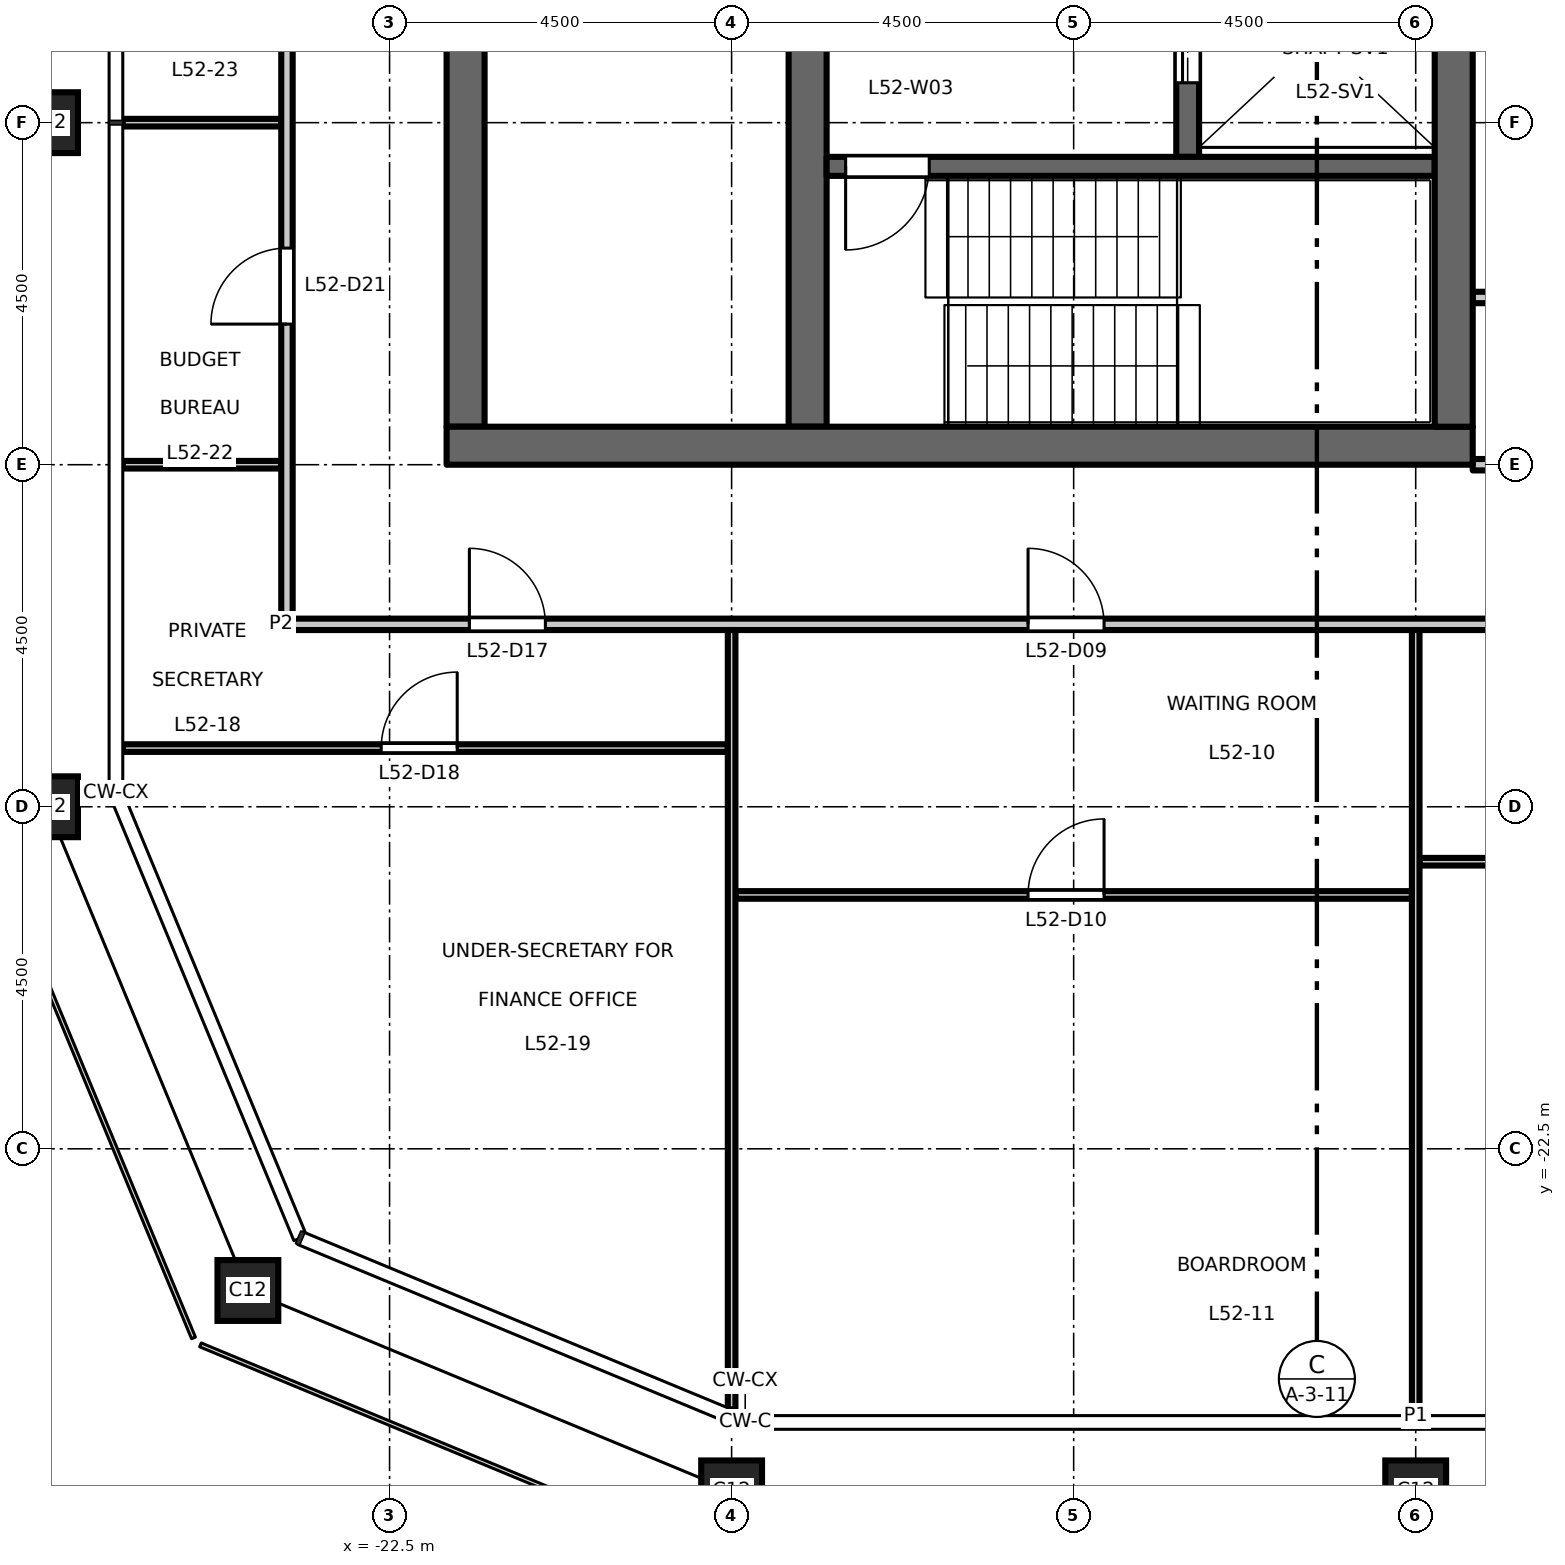
"""IFC4 building model, lengths in metres.
Left out: names, types, materials, properties, quantities, classifications, styles, units other than length and angle.
Written with IfcOpenShell. Run it as: python <this file> out.ifc"""

import sys

from ifc_helpers import new_model, si_unit, direction, frame, frame_2d, origin, origin_2d, place, context, subcontext, project, spatial, rectangle, hollow_rectangle, extrude, element, fill, save


model = new_model("IFC4")
c1 = context("Model", 3, precision=1e-05, world=origin(), true_north=direction((0.0, 1.0)))
c2 = subcontext(c1, "Body", "Model", "MODEL_VIEW")
j1 = project(units=[si_unit("LENGTHUNIT", "METRE"), si_unit("PLANEANGLEUNIT", "RADIAN")], contexts=[c1])
p1 = place(None, origin())
s1 = spatial("IfcSite", under=j1, at=p1, CompositionType="ELEMENT")
p2 = place(p1, origin())
s2 = spatial("IfcBuilding", under=s1, at=p2, CompositionType="ELEMENT")
p3 = place(p2, frame((0.0, 0.0, 242.2)))
s3 = spatial("IfcBuildingStorey", under=s2, at=p3, CompositionType="ELEMENT", Elevation=242.2)
for number, where, z_axis, x_axis in (
    (1, (-18.0, -27.0, 0.0), (0.0, 0.0, 1.0), (1.0, 0.0, 0.0)),
    (2, (-9.0, -27.0, 0.0), (0.0, 0.0, 1.0), (1.0, 0.0, 0.0)),
    (3, (-27.0, -9.0, 0.0), (0.0, 0.0, 1.0), (1.0, 0.0, 0.0)),
    (4, (-27.0, -18.0, 0.0), (0.0, 0.0, 1.0), (1.0, 0.0, 0.0)),
    (5, (-24.364, -24.364, 0.0), (0.0, 0.0, 1.0), (1.0, 0.0, 0.0)),
):
    element("IfcColumn", number, at=place(p3, frame(where, z_axis=z_axis, x_axis=x_axis)), inside=s3, PredefinedType="COLUMN", context=c2, shape_type="SweptSolid", body=[
        extrude(hollow_rectangle(XDim=0.8, YDim=0.8, WallThickness=0.045, at=origin_2d()), origin(), (0.0, 0.0, 1.0), 4.5),
    ])
p4 = place(p3, frame((-12.0, -9.45, 0.0), z_axis=(0.0, 0.0, 1.0), x_axis=(0.0, 1.0, 0.0)))
e6 = element("IfcWall", 6, at=p4, inside=s3, PredefinedType="SHEAR", context=c2, shape_type="SweptSolid", body=[
    extrude(rectangle(XDim=18.9, YDim=0.3, at=frame_2d((9.45, 0.0))), origin(), (0.0, 0.0, 1.0), 4.35),
])
p5 = place(p4, frame((4.725, 0.0, 0.0)))
e7 = element("IfcOpeningElement", 7, at=p5, cuts=e6, PredefinedType="OPENING", context=c2, shape_type="SweptSolid", body=[
    extrude(rectangle(XDim=1.1, YDim=2.1, at=frame_2d((0.55, 1.05))), frame((0.0, 0.16, 0.0), z_axis=(0.0, -1.0, 0.0), x_axis=(1.0, 0.0, 0.0)), (0.0, 0.0, 1.0), 0.32),
])
p6 = place(p4, frame((7.875, 0.0, 0.0)))
e8 = element("IfcOpeningElement", 8, at=p6, cuts=e6, PredefinedType="OPENING", context=c2, shape_type="SweptSolid", body=[
    extrude(rectangle(XDim=1.1, YDim=2.1, at=frame_2d((0.55, 1.05))), frame((0.0, 0.16, 0.0), z_axis=(0.0, -1.0, 0.0), x_axis=(1.0, 0.0, 0.0)), (0.0, 0.0, 1.0), 0.32),
])
p7 = place(p4, frame((11.025, 0.0, 0.0)))
e9 = element("IfcOpeningElement", 9, at=p7, cuts=e6, PredefinedType="OPENING", context=c2, shape_type="SweptSolid", body=[
    extrude(rectangle(XDim=1.1, YDim=2.1, at=frame_2d((0.55, 1.05))), frame((0.0, 0.16, 0.0), z_axis=(0.0, -1.0, 0.0), x_axis=(1.0, 0.0, 0.0)), (0.0, 0.0, 1.0), 0.32),
])
p8 = place(p4, frame((14.175, 0.0, 0.0)))
e10 = element("IfcOpeningElement", 10, at=p8, cuts=e6, PredefinedType="OPENING", context=c2, shape_type="SweptSolid", body=[
    extrude(rectangle(XDim=1.1, YDim=2.1, at=frame_2d((0.55, 1.05))), frame((0.0, 0.16, 0.0), z_axis=(0.0, -1.0, 0.0), x_axis=(1.0, 0.0, 0.0)), (0.0, 0.0, 1.0), 0.32),
])
p9 = place(p4, frame((16.725, 0.0, 0.0)))
e11 = element("IfcOpeningElement", 11, at=p9, cuts=e6, PredefinedType="OPENING", context=c2, shape_type="SweptSolid", body=[
    extrude(rectangle(XDim=1.2, YDim=2.1, at=frame_2d((0.6, 1.05))), frame((0.0, 0.16, 0.0), z_axis=(0.0, -1.0, 0.0), x_axis=(1.0, 0.0, 0.0)), (0.0, 0.0, 1.0), 0.32),
])
p10 = place(p4, frame((0.975, 0.0, 0.0)))
e12 = element("IfcOpeningElement", 12, at=p10, cuts=e6, PredefinedType="OPENING", context=c2, shape_type="SweptSolid", body=[
    extrude(rectangle(XDim=1.2, YDim=2.1, at=frame_2d((0.6, 1.05))), frame((0.0, 0.16, 0.0), z_axis=(0.0, -1.0, 0.0), x_axis=(1.0, 0.0, 0.0)), (0.0, 0.0, 1.0), 0.32),
])
p11 = place(p3, frame((-21.5, -13.0, 0.0), z_axis=(0.0, 0.0, 1.0), x_axis=(0.0, 1.0, 0.0)))
e13 = element("IfcWall", 13, at=p11, inside=s3, PredefinedType="SHEAR", context=c2, shape_type="SweptSolid", body=[
    extrude(rectangle(XDim=26.0, YDim=0.5, at=frame_2d((13.0, 0.0))), origin(), (0.0, 0.0, 1.0), 4.35),
])
p12 = place(p11, frame((16.825, 0.0, 0.0)))
e14 = element("IfcOpeningElement", 14, at=p12, cuts=e13, PredefinedType="OPENING", context=c2, shape_type="SweptSolid", body=[
    extrude(rectangle(XDim=1.8, YDim=2.1, at=frame_2d((0.9, 1.05))), frame((0.0, 0.26, 0.0), z_axis=(0.0, -1.0, 0.0), x_axis=(1.0, 0.0, 0.0)), (0.0, 0.0, 1.0), 0.52),
])
p13 = place(p11, frame((7.375, 0.0, 0.0)))
e15 = element("IfcOpeningElement", 15, at=p13, cuts=e13, PredefinedType="OPENING", context=c2, shape_type="SweptSolid", body=[
    extrude(rectangle(XDim=1.8, YDim=2.1, at=frame_2d((0.9, 1.05))), frame((0.0, 0.26, 0.0), z_axis=(0.0, -1.0, 0.0), x_axis=(1.0, 0.0, 0.0)), (0.0, 0.0, 1.0), 0.52),
])
p14 = place(p3, frame((-17.0, -13.0, 0.0), z_axis=(0.0, 0.0, 1.0), x_axis=(0.0, 1.0, 0.0)))
e16 = element("IfcWall", 16, at=p14, inside=s3, PredefinedType="SHEAR", context=c2, shape_type="SweptSolid", body=[
    extrude(rectangle(XDim=6.575, YDim=0.5, at=frame_2d((3.288, 0.0))), origin(), (0.0, 0.0, 1.0), 4.35),
])
p15 = place(p3, frame((-8.75, -9.575, 0.0), z_axis=(0.0, 0.0, 1.0), x_axis=(-1.0, 0.0, 0.0)))
e17 = element("IfcWall", 17, at=p15, inside=s3, PredefinedType="SHEAR", context=c2, shape_type="SweptSolid", body=[
    extrude(rectangle(XDim=8.0, YDim=0.25, at=frame_2d((4.0, 0.0))), origin(), (0.0, 0.0, 1.0), 4.35),
])
p16 = place(p15, frame((6.65, 0.0, 0.0)))
e18 = element("IfcOpeningElement", 18, at=p16, cuts=e17, PredefinedType="OPENING", context=c2, shape_type="SweptSolid", body=[
    extrude(rectangle(XDim=1.1, YDim=2.1, at=frame_2d((0.55, 1.05))), frame((0.0, 0.135, 0.0), z_axis=(0.0, -1.0, 0.0), x_axis=(1.0, 0.0, 0.0)), (0.0, 0.0, 1.0), 0.27),
])
p17 = place(p3, frame((-8.25, -13.25, 0.0), z_axis=(0.0, 0.0, 1.0), x_axis=(-1.0, 0.0, 0.0)))
e19 = element("IfcWall", 19, at=p17, inside=s3, PredefinedType="SHEAR", context=c2, shape_type="SweptSolid", body=[
    extrude(rectangle(XDim=13.5, YDim=0.5, at=frame_2d((6.75, 0.0))), origin(), (0.0, 0.0, 1.0), 4.35),
])
p18 = place(p3, frame((-8.5, -13.0, 0.0), z_axis=(0.0, 0.0, 1.0), x_axis=(0.0, 1.0, 0.0)))
e20 = element("IfcWall", 20, at=p18, inside=s3, PredefinedType="SHEAR", context=c2, shape_type="SweptSolid", body=[
    extrude(rectangle(XDim=26.0, YDim=0.5, at=frame_2d((13.0, 0.0))), origin(), (0.0, 0.0, 1.0), 4.35),
])
p19 = place(p3, frame((-17.95, -19.16, 0.0), z_axis=(0.0, 0.0, 1.0), x_axis=(1.0, 0.0, 0.0)))
e21 = element("IfcWall", 21, at=p19, inside=s3, PredefinedType="PARTITIONING", context=c2, shape_type="SweptSolid", body=[
    extrude(rectangle(XDim=8.9, YDim=0.1, at=frame_2d((4.45, 0.0))), origin(), (0.0, 0.0, 1.0), 4.35),
])
p20 = place(p19, frame((3.85, 0.0, 0.0)))
e22 = element("IfcOpeningElement", 22, at=p20, cuts=e21, PredefinedType="OPENING", context=c2, shape_type="SweptSolid", body=[
    extrude(rectangle(XDim=1.0, YDim=2.1, at=frame_2d((0.5, 1.05))), frame((0.0, 0.06, 0.0), z_axis=(0.0, -1.0, 0.0), x_axis=(1.0, 0.0, 0.0)), (0.0, 0.0, 1.0), 0.12),
])
p21 = place(p3, frame((-8.95, -18.723, 0.0), z_axis=(0.0, 0.0, 1.0), x_axis=(1.0, 0.0, 0.0)))
e23 = element("IfcWall", 23, at=p21, inside=s3, PredefinedType="PARTITIONING", context=c2, shape_type="SweptSolid", body=[
    extrude(rectangle(XDim=8.9, YDim=0.1, at=frame_2d((4.45, 0.0))), origin(), (0.0, 0.0, 1.0), 4.35),
])
p22 = place(p21, frame((3.85, 0.0, 0.0)))
e24 = element("IfcOpeningElement", 24, at=p22, cuts=e23, PredefinedType="OPENING", context=c2, shape_type="SweptSolid", body=[
    extrude(rectangle(XDim=1.0, YDim=2.1, at=frame_2d((0.5, 1.05))), frame((0.0, 0.06, 0.0), z_axis=(0.0, -1.0, 0.0), x_axis=(1.0, 0.0, 0.0)), (0.0, 0.0, 1.0), 0.12),
])
p23 = place(p3, frame((-26.01, -17.228, 0.0), z_axis=(0.0, 0.0, 1.0), x_axis=(1.0, 0.0, 0.0)))
e25 = element("IfcWall", 25, at=p23, inside=s3, PredefinedType="PARTITIONING", context=c2, shape_type="SweptSolid", body=[
    extrude(rectangle(XDim=7.96, YDim=0.1, at=frame_2d((3.98, 0.0))), origin(), (0.0, 0.0, 1.0), 4.35),
])
p24 = place(p23, frame((3.4, 0.0, 0.0)))
e26 = element("IfcOpeningElement", 26, at=p24, cuts=e25, PredefinedType="OPENING", context=c2, shape_type="SweptSolid", body=[
    extrude(rectangle(XDim=1.0, YDim=2.1, at=frame_2d((0.5, 1.05))), frame((0.0, 0.06, 0.0), z_axis=(0.0, -1.0, 0.0), x_axis=(1.0, 0.0, 0.0)), (0.0, 0.0, 1.0), 0.12),
])
p25 = place(p3, frame((-23.925, -15.6, 0.0), z_axis=(0.0, 0.0, 1.0), x_axis=(1.0, 0.0, 0.0)))
e27 = element("IfcWall", 27, at=p25, inside=s3, PredefinedType="PARTITIONING", context=c2, shape_type="SweptSolid", body=[
    extrude(rectangle(XDim=47.85, YDim=0.15, at=frame_2d((23.925, 0.0))), origin(), (0.0, 0.0, 1.0), 4.35),
])
p26 = place(p25, frame((9.825, 0.0, 0.0)))
e28 = element("IfcOpeningElement", 28, at=p26, cuts=e27, PredefinedType="OPENING", context=c2, shape_type="SweptSolid", body=[
    extrude(rectangle(XDim=1.0, YDim=2.1, at=frame_2d((0.5, 1.05))), frame((0.0, 0.085, 0.0), z_axis=(0.0, -1.0, 0.0), x_axis=(1.0, 0.0, 0.0)), (0.0, 0.0, 1.0), 0.17),
])
p27 = place(p25, frame((18.825, 0.0, 0.0)))
e29 = element("IfcOpeningElement", 29, at=p27, cuts=e27, PredefinedType="OPENING", context=c2, shape_type="SweptSolid", body=[
    extrude(rectangle(XDim=1.0, YDim=2.1, at=frame_2d((0.5, 1.05))), frame((0.0, 0.085, 0.0), z_axis=(0.0, -1.0, 0.0), x_axis=(1.0, 0.0, 0.0)), (0.0, 0.0, 1.0), 0.17),
])
p28 = place(p25, frame((27.825, 0.0, 0.0)))
e30 = element("IfcOpeningElement", 30, at=p28, cuts=e27, PredefinedType="OPENING", context=c2, shape_type="SweptSolid", body=[
    extrude(rectangle(XDim=1.0, YDim=2.1, at=frame_2d((0.5, 1.05))), frame((0.0, 0.085, 0.0), z_axis=(0.0, -1.0, 0.0), x_axis=(1.0, 0.0, 0.0)), (0.0, 0.0, 1.0), 0.17),
])
p29 = place(p25, frame((36.825, 0.0, 0.0)))
e31 = element("IfcOpeningElement", 31, at=p29, cuts=e27, PredefinedType="OPENING", context=c2, shape_type="SweptSolid", body=[
    extrude(rectangle(XDim=1.0, YDim=2.1, at=frame_2d((0.5, 1.05))), frame((0.0, 0.085, 0.0), z_axis=(0.0, -1.0, 0.0), x_axis=(1.0, 0.0, 0.0)), (0.0, 0.0, 1.0), 0.17),
])
p30 = place(p25, frame((2.475, 0.0, 0.0)))
e32 = element("IfcOpeningElement", 32, at=p30, cuts=e27, PredefinedType="OPENING", context=c2, shape_type="SweptSolid", body=[
    extrude(rectangle(XDim=1.0, YDim=2.1, at=frame_2d((0.5, 1.05))), frame((0.0, 0.085, 0.0), z_axis=(0.0, -1.0, 0.0), x_axis=(1.0, 0.0, 0.0)), (0.0, 0.0, 1.0), 0.17),
])
p31 = place(p25, frame((44.325, 0.0, 0.0)))
e33 = element("IfcOpeningElement", 33, at=p31, cuts=e27, PredefinedType="OPENING", context=c2, shape_type="SweptSolid", body=[
    extrude(rectangle(XDim=1.0, YDim=2.1, at=frame_2d((0.5, 1.05))), frame((0.0, 0.085, 0.0), z_axis=(0.0, -1.0, 0.0), x_axis=(1.0, 0.0, 0.0)), (0.0, 0.0, 1.0), 0.17),
])
p32 = place(p3, frame((-26.01, -13.5, 0.0), z_axis=(0.0, 0.0, 1.0), x_axis=(1.0, 0.0, 0.0)))
e34 = element("IfcWall", 34, at=p32, inside=s3, PredefinedType="PARTITIONING", context=c2, shape_type="SweptSolid", body=[
    extrude(rectangle(XDim=2.085, YDim=0.1, at=frame_2d((1.042, 0.0))), origin(), (0.0, 0.0, 1.0), 3.95),
])
p33 = place(p3, frame((-8.25, -13.5, 0.0), z_axis=(0.0, 0.0, 1.0), x_axis=(1.0, 0.0, 0.0)))
e35 = element("IfcWall", 35, at=p33, inside=s3, PredefinedType="PARTITIONING", context=c2, shape_type="SweptSolid", body=[
    extrude(rectangle(XDim=16.5, YDim=0.15, at=frame_2d((8.25, 0.0))), origin(), (0.0, 0.0, 1.0), 3.95),
])
p34 = place(p33, frame((7.85, 0.0, 0.0)))
e36 = element("IfcOpeningElement", 36, at=p34, cuts=e35, PredefinedType="OPENING", context=c2, shape_type="SweptSolid", body=[
    extrude(rectangle(XDim=1.0, YDim=2.1, at=frame_2d((0.5, 1.05))), frame((0.0, 0.085, 0.0), z_axis=(0.0, -1.0, 0.0), x_axis=(1.0, 0.0, 0.0)), (0.0, 0.0, 1.0), 0.17),
])
p35 = place(p3, frame((-8.25, -11.3, 0.0), z_axis=(0.0, 0.0, 1.0), x_axis=(1.0, 0.0, 0.0)))
e37 = element("IfcWall", 37, at=p35, inside=s3, PredefinedType="PARTITIONING", context=c2, shape_type="SweptSolid", body=[
    extrude(rectangle(XDim=15.03, YDim=0.15, at=frame_2d((7.515, 0.0))), origin(), (0.0, 0.0, 1.0), 4.35),
])
p36 = place(p35, frame((2.6, 0.0, 0.0)))
e38 = element("IfcOpeningElement", 38, at=p36, cuts=e37, PredefinedType="OPENING", context=c2, shape_type="SweptSolid", body=[
    extrude(rectangle(XDim=1.0, YDim=2.1, at=frame_2d((0.5, 1.05))), frame((0.0, 0.085, 0.0), z_axis=(0.0, -1.0, 0.0), x_axis=(1.0, 0.0, 0.0)), (0.0, 0.0, 1.0), 0.17),
])
p37 = place(p35, frame((8.85, 0.0, 0.0)))
e39 = element("IfcOpeningElement", 39, at=p37, cuts=e37, PredefinedType="OPENING", context=c2, shape_type="SweptSolid", body=[
    extrude(rectangle(XDim=1.0, YDim=2.1, at=frame_2d((0.5, 1.05))), frame((0.0, 0.085, 0.0), z_axis=(0.0, -1.0, 0.0), x_axis=(1.0, 0.0, 0.0)), (0.0, 0.0, 1.0), 0.17),
])
p38 = place(p35, frame((13.13, 0.0, 0.0)))
e40 = element("IfcOpeningElement", 40, at=p38, cuts=e37, PredefinedType="OPENING", context=c2, shape_type="SweptSolid", body=[
    extrude(rectangle(XDim=1.0, YDim=2.1, at=frame_2d((0.5, 1.05))), frame((0.0, 0.085, 0.0), z_axis=(0.0, -1.0, 0.0), x_axis=(1.0, 0.0, 0.0)), (0.0, 0.0, 1.0), 0.17),
])
p39 = place(p3, frame((-26.01, -9.0, 0.0), z_axis=(0.0, 0.0, 1.0), x_axis=(1.0, 0.0, 0.0)))
e41 = element("IfcWall", 41, at=p39, inside=s3, PredefinedType="PARTITIONING", context=c2, shape_type="SweptSolid", body=[
    extrude(rectangle(XDim=2.085, YDim=0.1, at=frame_2d((1.042, 0.0))), origin(), (0.0, 0.0, 1.0), 4.35),
])
p40 = place(p3, frame((-23.85, -15.525, 0.0), z_axis=(0.0, 0.0, 1.0), x_axis=(0.0, 1.0, 0.0)))
e42 = element("IfcWall", 42, at=p40, inside=s3, PredefinedType="PARTITIONING", context=c2, shape_type="SweptSolid", body=[
    extrude(rectangle(XDim=31.05, YDim=0.15, at=frame_2d((15.525, 0.0))), origin(), (0.0, 0.0, 1.0), 4.35),
])
p41 = place(p40, frame((3.875, 0.0, 0.0)))
e43 = element("IfcOpeningElement", 43, at=p41, cuts=e42, PredefinedType="OPENING", context=c2, shape_type="SweptSolid", body=[
    extrude(rectangle(XDim=1.0, YDim=2.1, at=frame_2d((0.5, 1.05))), frame((0.0, 0.085, 0.0), z_axis=(0.0, -1.0, 0.0), x_axis=(1.0, 0.0, 0.0)), (0.0, 0.0, 1.0), 0.17),
])
p42 = place(p40, frame((10.625, 0.0, 0.0)))
e44 = element("IfcOpeningElement", 44, at=p42, cuts=e42, PredefinedType="OPENING", context=c2, shape_type="SweptSolid", body=[
    extrude(rectangle(XDim=1.0, YDim=2.1, at=frame_2d((0.5, 1.05))), frame((0.0, 0.085, 0.0), z_axis=(0.0, -1.0, 0.0), x_axis=(1.0, 0.0, 0.0)), (0.0, 0.0, 1.0), 0.17),
])
p43 = place(p40, frame((19.625, 0.0, 0.0)))
e45 = element("IfcOpeningElement", 45, at=p43, cuts=e42, PredefinedType="OPENING", context=c2, shape_type="SweptSolid", body=[
    extrude(rectangle(XDim=1.0, YDim=2.1, at=frame_2d((0.5, 1.05))), frame((0.0, 0.085, 0.0), z_axis=(0.0, -1.0, 0.0), x_axis=(1.0, 0.0, 0.0)), (0.0, 0.0, 1.0), 0.17),
])
p44 = place(p40, frame((26.375, 0.0, 0.0)))
e46 = element("IfcOpeningElement", 46, at=p44, cuts=e42, PredefinedType="OPENING", context=c2, shape_type="SweptSolid", body=[
    extrude(rectangle(XDim=1.0, YDim=2.1, at=frame_2d((0.5, 1.05))), frame((0.0, 0.085, 0.0), z_axis=(0.0, -1.0, 0.0), x_axis=(1.0, 0.0, 0.0)), (0.0, 0.0, 1.0), 0.17),
])
p45 = place(p3, frame((-18.0, -25.928, 0.0), z_axis=(0.0, 0.0, 1.0), x_axis=(0.0, 1.0, 0.0)))
e47 = element("IfcWall", 47, at=p45, inside=s3, PredefinedType="PARTITIONING", context=c2, shape_type="SweptSolid", body=[
    extrude(rectangle(XDim=10.253, YDim=0.1, at=frame_2d((5.126, 0.0))), origin(), (0.0, 0.0, 1.0), 3.65),
])
p46 = place(p3, frame((-9.0, -26.01, 0.0), z_axis=(0.0, 0.0, 1.0), x_axis=(0.0, 1.0, 0.0)))
e48 = element("IfcWall", 48, at=p46, inside=s3, PredefinedType="PARTITIONING", context=c2, shape_type="SweptSolid", body=[
    extrude(rectangle(XDim=10.335, YDim=0.1, at=frame_2d((5.167, 0.0))), origin(), (0.0, 0.0, 1.0), 3.65),
])
p47 = place(p16, origin())
e49 = element("IfcDoor", 49, at=p47, inside=s3, OperationType="SINGLE_SWING_LEFT", PredefinedType="DOOR", context=c2, shape_type="SweptSolid", body=[
    extrude(rectangle(XDim=1.1, YDim=2.1, at=frame_2d((0.55, 1.05))), frame((0.0, 0.025, 0.0), z_axis=(0.0, -1.0, 0.0), x_axis=(1.0, 0.0, 0.0)), (0.0, 0.0, 1.0), 0.05),
])
fill(e18, e49)
p48 = place(p10, origin())
e50 = element("IfcDoor", 50, at=p48, inside=s3, OperationType="DOUBLE_DOOR_SLIDING", PredefinedType="DOOR", context=c2, shape_type="SweptSolid", body=[
    extrude(rectangle(XDim=1.2, YDim=2.1, at=frame_2d((0.6, 1.05))), frame((0.0, 0.025, 0.0), z_axis=(0.0, -1.0, 0.0), x_axis=(1.0, 0.0, 0.0)), (0.0, 0.0, 1.0), 0.05),
])
fill(e12, e50)
p49 = place(p26, origin())
e51 = element("IfcDoor", 51, at=p49, inside=s3, OperationType="SINGLE_SWING_LEFT", PredefinedType="DOOR", context=c2, shape_type="SweptSolid", body=[
    extrude(rectangle(XDim=1.0, YDim=2.1, at=frame_2d((0.5, 1.05))), frame((0.0, 0.025, 0.0), z_axis=(0.0, -1.0, 0.0), x_axis=(1.0, 0.0, 0.0)), (0.0, 0.0, 1.0), 0.05),
])
fill(e28, e51)
p50 = place(p20, origin())
e52 = element("IfcDoor", 52, at=p50, inside=s3, OperationType="SINGLE_SWING_RIGHT", PredefinedType="DOOR", context=c2, shape_type="SweptSolid", body=[
    extrude(rectangle(XDim=1.0, YDim=2.1, at=frame_2d((0.5, 1.05))), frame((0.0, 0.025, 0.0), z_axis=(0.0, -1.0, 0.0), x_axis=(1.0, 0.0, 0.0)), (0.0, 0.0, 1.0), 0.05),
])
fill(e22, e52)
p51 = place(p30, origin())
e53 = element("IfcDoor", 53, at=p51, inside=s3, OperationType="SINGLE_SWING_LEFT", PredefinedType="DOOR", context=c2, shape_type="SweptSolid", body=[
    extrude(rectangle(XDim=1.0, YDim=2.1, at=frame_2d((0.5, 1.05))), frame((0.0, 0.025, 0.0), z_axis=(0.0, -1.0, 0.0), x_axis=(1.0, 0.0, 0.0)), (0.0, 0.0, 1.0), 0.05),
])
fill(e32, e53)
p52 = place(p24, origin())
e54 = element("IfcDoor", 54, at=p52, inside=s3, OperationType="SINGLE_SWING_RIGHT", PredefinedType="DOOR", context=c2, shape_type="SweptSolid", body=[
    extrude(rectangle(XDim=1.0, YDim=2.1, at=frame_2d((0.5, 1.05))), frame((0.0, 0.025, 0.0), z_axis=(0.0, -1.0, 0.0), x_axis=(1.0, 0.0, 0.0)), (0.0, 0.0, 1.0), 0.05),
])
fill(e26, e54)
p53 = place(p41, origin())
e55 = element("IfcDoor", 55, at=p53, inside=s3, OperationType="SINGLE_SWING_LEFT", PredefinedType="DOOR", context=c2, shape_type="SweptSolid", body=[
    extrude(rectangle(XDim=1.0, YDim=2.1, at=frame_2d((0.5, 1.05))), frame((0.0, 0.025, 0.0), z_axis=(0.0, -1.0, 0.0), x_axis=(1.0, 0.0, 0.0)), (0.0, 0.0, 1.0), 0.05),
])
fill(e43, e55)
save(model, sys.argv[1])
